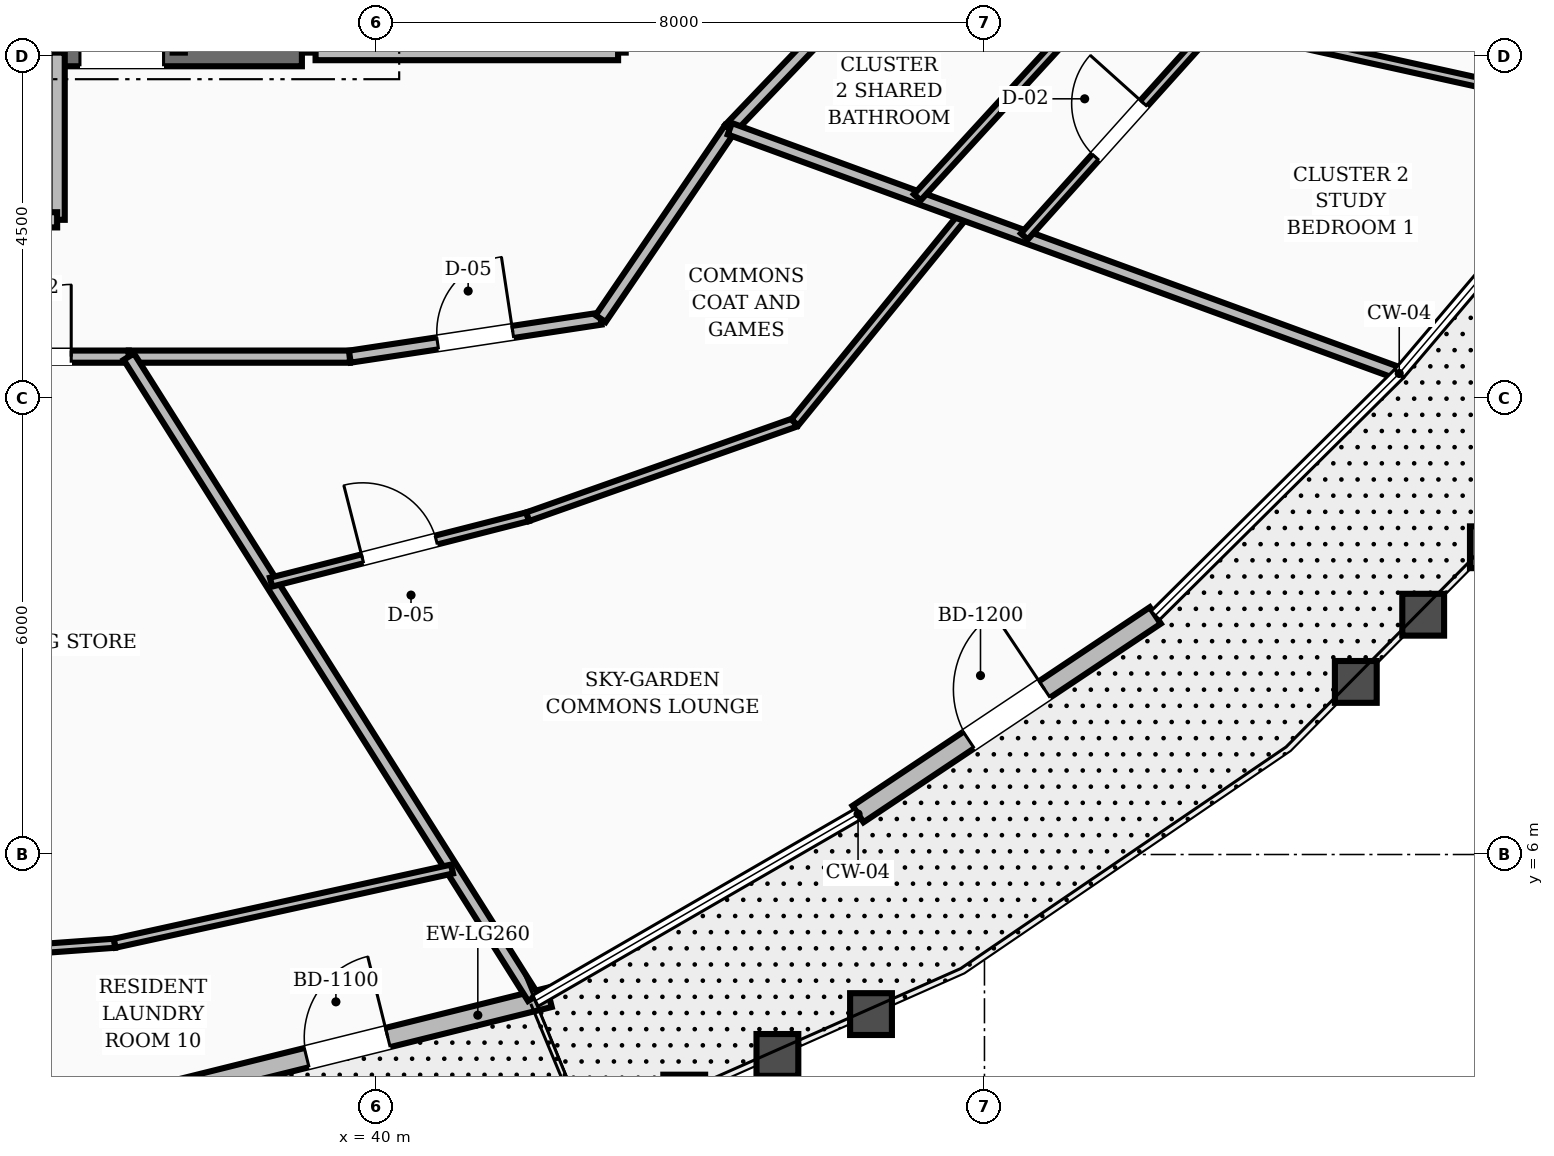
"""IFC4 building model, lengths in metres.
Left out: names, types, materials, properties, quantities, classifications, styles, units other than length and angle.
Written with IfcOpenShell. Run it as: python <this file> out.ifc"""

import sys

from ifc_helpers import new_model, si_unit, direction, frame, frame_2d, origin, place, context, subcontext, project, spatial, rectangle, extrude, element, fill, save


model = new_model("IFC4")
c1 = context("Model", 3, precision=1e-05, world=origin(), true_north=direction((0.0, 1.0)))
c2 = subcontext(c1, "Body", "Model", "MODEL_VIEW")
j1 = project(units=[si_unit("LENGTHUNIT", "METRE"), si_unit("PLANEANGLEUNIT", "RADIAN")], contexts=[c1])
p1 = place(None, origin())
s1 = spatial("IfcSite", under=j1, at=p1, CompositionType="ELEMENT")
p2 = place(p1, origin())
s2 = spatial("IfcBuilding", under=s1, at=p2, CompositionType="ELEMENT")
p3 = place(p2, frame((0.0, 0.0, 149.6)))
s3 = spatial("IfcBuildingStorey", under=s2, at=p3, CompositionType="ELEMENT", Elevation=149.6)
p4 = place(p3, frame((35.8, 16.55, 0.0), z_axis=(0.0, 0.0, 1.0), x_axis=(1.0, 0.0, 0.0)))
e1 = element("IfcWall", 1, at=p4, inside=s3, PredefinedType="SHEAR", context=c2, shape_type="SweptSolid", body=[
    extrude(rectangle(XDim=3.22, YDim=0.36, at=frame_2d((1.61, 0.0))), origin(), (0.0, 0.0, 1.0), 3.6),
])
p5 = place(p4, frame((0.3, 0.0, 0.0)))
e2 = element("IfcOpeningElement", 2, at=p5, cuts=e1, PredefinedType="OPENING", context=c2, shape_type="SweptSolid", body=[
    extrude(rectangle(XDim=1.1, YDim=2.1, at=frame_2d((0.55, 1.05))), frame((0.0, 0.19, 0.0), z_axis=(0.0, -1.0, 0.0), x_axis=(1.0, 0.0, 0.0)), (0.0, 0.0, 1.0), 0.38),
])
p6 = place(p3, frame((37.144, 2.846, 0.0), z_axis=(0.0, 0.0, 1.0), x_axis=(0.970567406562, 0.240829627165, 0.0)))
e3 = element("IfcWall", 3, at=p6, inside=s3, PredefinedType="STANDARD", context=c2, shape_type="SweptSolid", body=[
    extrude(rectangle(XDim=5.288, YDim=0.26, at=frame_2d((2.644, 0.0))), origin(), (0.0, 0.0, 1.0), 2.82),
])
p7 = place(p6, frame((1.998, 0.0, 0.0)))
e4 = element("IfcOpeningElement", 4, at=p7, cuts=e3, PredefinedType="OPENING", context=c2, shape_type="SweptSolid", body=[
    extrude(rectangle(XDim=1.1, YDim=2.15, at=frame_2d((0.55, 1.075))), frame((0.0, 0.14, 0.0), z_axis=(0.0, -1.0, 0.0), x_axis=(1.0, 0.0, 0.0)), (0.0, 0.0, 1.0), 0.28),
])
p8 = place(p3, frame((46.337, 6.532, 0.0), z_axis=(0.0, 0.0, 1.0), x_axis=(0.831514821752, 0.555502566336, 0.0)))
e5 = element("IfcWall", 5, at=p8, inside=s3, PredefinedType="STANDARD", context=c2, shape_type="SweptSolid", body=[
    extrude(rectangle(XDim=4.703, YDim=0.26, at=frame_2d((2.352, 0.0))), origin(), (0.0, 0.0, 1.0), 2.82),
])
p9 = place(p8, frame((1.751, 0.0, 0.0)))
e6 = element("IfcOpeningElement", 6, at=p9, cuts=e5, PredefinedType="OPENING", context=c2, shape_type="SweptSolid", body=[
    extrude(rectangle(XDim=1.2, YDim=2.15, at=frame_2d((0.6, 1.075))), frame((0.0, 0.14, 0.0), z_axis=(0.0, -1.0, 0.0), x_axis=(1.0, 0.0, 0.0)), (0.0, 0.0, 1.0), 0.28),
])
p10 = place(p3, frame((39.2, 16.55, 0.0), z_axis=(0.0, 0.0, 1.0), x_axis=(1.0, 0.0, 0.0)))
e7 = element("IfcWall", 7, at=p10, inside=s3, PredefinedType="SOLIDWALL", context=c2, shape_type="SweptSolid", body=[
    extrude(rectangle(XDim=3.98, YDim=0.2, at=frame_2d((1.99, 0.0))), origin(), (0.0, 0.0, 1.0), 2.8),
])
p11 = place(p3, frame((35.8, 14.35, 0.0), z_axis=(0.0, 0.0, 1.0), x_axis=(0.0, 1.0, 0.0)))
e8 = element("IfcWall", 8, at=p11, inside=s3, PredefinedType="SOLIDWALL", context=c2, shape_type="SweptSolid", body=[
    extrude(rectangle(XDim=2.2, YDim=0.2, at=frame_2d((1.1, 0.0))), origin(), (0.0, 0.0, 1.0), 2.8),
])
p12 = place(p3, frame((28.2, 14.35, 0.0), z_axis=(0.0, 0.0, 1.0), x_axis=(1.0, 0.0, 0.0)))
e9 = element("IfcWall", 9, at=p12, inside=s3, PredefinedType="SOLIDWALL", context=c2, shape_type="SweptSolid", body=[
    extrude(rectangle(XDim=7.6, YDim=0.2, at=frame_2d((3.8, 0.0))), origin(), (0.0, 0.0, 1.0), 2.8),
])
p13 = place(p12, frame((3.2, 0.0, 0.0)))
e10 = element("IfcOpeningElement", 10, at=p13, cuts=e9, PredefinedType="OPENING", context=c2, shape_type="SweptSolid", body=[
    extrude(rectangle(XDim=1.2, YDim=2.1, at=frame_2d((0.6, 1.05))), frame((0.0, 0.11, 0.0), z_axis=(0.0, -1.0, 0.0), x_axis=(1.0, 0.0, 0.0)), (0.0, 0.0, 1.0), 0.22),
])
p14 = place(p3, frame((34.278, 12.55, 0.0), z_axis=(0.0, 0.0, 1.0), x_axis=(1.0, 0.0, 0.0)))
e11 = element("IfcWall", 11, at=p14, inside=s3, PredefinedType="SOLIDWALL", context=c2, shape_type="SweptSolid", body=[
    extrude(rectangle(XDim=2.465, YDim=0.16, at=frame_2d((1.232, 0.0))), origin(), (0.0, 0.0, 1.0), 2.8),
])
p15 = place(p14, frame((0.758, 0.0, 0.0)))
e12 = element("IfcOpeningElement", 12, at=p15, cuts=e11, PredefinedType="OPENING", context=c2, shape_type="SweptSolid", body=[
    extrude(rectangle(XDim=0.95, YDim=2.1, at=frame_2d((0.475, 1.05))), frame((0.0, 0.09, 0.0), z_axis=(0.0, -1.0, 0.0), x_axis=(1.0, 0.0, 0.0)), (0.0, 0.0, 1.0), 0.18),
])
p16 = place(p3, frame((36.743, 12.55, 0.0), z_axis=(0.0, 0.0, 1.0), x_axis=(1.0, 0.0, 0.0)))
e13 = element("IfcWall", 13, at=p16, inside=s3, PredefinedType="SOLIDWALL", context=c2, shape_type="SweptSolid", body=[
    extrude(rectangle(XDim=2.908, YDim=0.16, at=frame_2d((1.454, 0.0))), origin(), (0.0, 0.0, 1.0), 2.8),
])
p17 = place(p3, frame((39.651, 12.55, 0.0), z_axis=(0.0, 0.0, 1.0), x_axis=(0.988710906508, 0.149835721217, 0.0)))
e14 = element("IfcWall", 14, at=p17, inside=s3, PredefinedType="SOLIDWALL", context=c2, shape_type="SweptSolid", body=[
    extrude(rectangle(XDim=3.337, YDim=0.16, at=frame_2d((1.668, 0.0))), origin(), (0.0, 0.0, 1.0), 2.8),
])
p18 = place(p17, frame((1.168, 0.0, 0.0)))
e15 = element("IfcOpeningElement", 15, at=p18, cuts=e14, PredefinedType="OPENING", context=c2, shape_type="SweptSolid", body=[
    extrude(rectangle(XDim=1.0, YDim=2.1, at=frame_2d((0.5, 1.05))), frame((0.0, 0.09, 0.0), z_axis=(0.0, -1.0, 0.0), x_axis=(1.0, 0.0, 0.0)), (0.0, 0.0, 1.0), 0.18),
])
p19 = place(p3, frame((42.95, 13.05, 0.0), z_axis=(0.0, 0.0, 1.0), x_axis=(0.562674669208, 0.826678423955, 0.0)))
e16 = element("IfcWall", 16, at=p19, inside=s3, PredefinedType="SOLIDWALL", context=c2, shape_type="SweptSolid", body=[
    extrude(rectangle(XDim=3.021, YDim=0.16, at=frame_2d((1.511, 0.0))), origin(), (0.0, 0.0, 1.0), 2.8),
])
p20 = place(p3, frame((44.65, 15.548, 0.0), z_axis=(0.0, 0.0, 1.0), x_axis=(0.691055487108, 0.722801711216, 0.0)))
e17 = element("IfcWall", 17, at=p20, inside=s3, PredefinedType="SOLIDWALL", context=c2, shape_type="SweptSolid", body=[
    extrude(rectangle(XDim=3.184, YDim=0.16, at=frame_2d((1.592, 0.0))), origin(), (0.0, 0.0, 1.0), 2.8),
])
p21 = place(p3, frame((36.743, 12.55, 0.0), z_axis=(0.0, 0.0, 1.0), x_axis=(0.533539707284, -0.84577501781, 0.0)))
e18 = element("IfcWall", 18, at=p21, inside=s3, PredefinedType="SOLIDWALL", context=c2, shape_type="SweptSolid", body=[
    extrude(rectangle(XDim=9.972, YDim=0.16, at=frame_2d((4.986, 0.0))), origin(), (0.0, 0.0, 1.0), 2.8),
])
p22 = place(p3, frame((38.614, 9.583, 0.0), z_axis=(0.0, 0.0, 1.0), x_axis=(0.969019467612, 0.246984354543, 0.0)))
e19 = element("IfcWall", 19, at=p22, inside=s3, PredefinedType="PARTITIONING", context=c2, shape_type="SweptSolid", body=[
    extrude(rectangle(XDim=3.484, YDim=0.12, at=frame_2d((1.742, 0.0))), origin(), (0.0, 0.0, 1.0), 2.8),
])
p23 = place(p22, frame((1.242, 0.0, 0.0)))
e20 = element("IfcOpeningElement", 20, at=p23, cuts=e19, PredefinedType="OPENING", context=c2, shape_type="SweptSolid", body=[
    extrude(rectangle(XDim=1.0, YDim=2.1, at=frame_2d((0.5, 1.05))), frame((0.0, 0.07, 0.0), z_axis=(0.0, -1.0, 0.0), x_axis=(1.0, 0.0, 0.0)), (0.0, 0.0, 1.0), 0.14),
])
p24 = place(p3, frame((41.991, 10.444, 0.0), z_axis=(0.0, 0.0, 1.0), x_axis=(0.943035086746, 0.332693289932, 0.0)))
e21 = element("IfcWall", 21, at=p24, inside=s3, PredefinedType="PARTITIONING", context=c2, shape_type="SweptSolid", body=[
    extrude(rectangle(XDim=3.726, YDim=0.12, at=frame_2d((1.863, 0.0))), origin(), (0.0, 0.0, 1.0), 2.8),
])
p25 = place(p3, frame((45.504, 11.683, 0.0), z_axis=(0.0, 0.0, 1.0), x_axis=(0.631277203428, 0.775557278628, 0.0)))
e22 = element("IfcWall", 22, at=p25, inside=s3, PredefinedType="PARTITIONING", context=c2, shape_type="SweptSolid", body=[
    extrude(rectangle(XDim=3.53, YDim=0.12, at=frame_2d((1.765, 0.0))), origin(), (0.0, 0.0, 1.0), 2.8),
])
p26 = place(p3, frame((44.65, 15.548, 0.0), z_axis=(0.0, 0.0, 1.0), x_axis=(0.939222726392, -0.343308418524, 0.0)))
e23 = element("IfcWall", 23, at=p26, inside=s3, PredefinedType="SOLIDWALL", context=c2, shape_type="SweptSolid", body=[
    extrude(rectangle(XDim=9.327, YDim=0.16, at=frame_2d((4.663, 0.0))), origin(), (0.0, 0.0, 1.0), 2.8),
])
p27 = place(p3, frame((47.116, 14.646, 0.0), z_axis=(0.0, 0.0, 1.0), x_axis=(0.675771389029, 0.737111273669, 0.0)))
e24 = element("IfcWall", 24, at=p27, inside=s3, PredefinedType="PARTITIONING", context=c2, shape_type="SweptSolid", body=[
    extrude(rectangle(XDim=3.546, YDim=0.12, at=frame_2d((1.773, 0.0))), origin(), (0.0, 0.0, 1.0), 2.8),
])
p28 = place(p3, frame((48.525, 14.131, 0.0), z_axis=(0.0, 0.0, 1.0), x_axis=(0.668314174757, 0.743879132533, 0.0)))
e25 = element("IfcWall", 25, at=p28, inside=s3, PredefinedType="PARTITIONING", context=c2, shape_type="SweptSolid", body=[
    extrude(rectangle(XDim=3.754, YDim=0.12, at=frame_2d((1.877, 0.0))), origin(), (0.0, 0.0, 1.0), 2.8),
])
p29 = place(p28, frame((1.402, 0.0, 0.0)))
e26 = element("IfcOpeningElement", 26, at=p29, cuts=e25, PredefinedType="OPENING", context=c2, shape_type="SweptSolid", body=[
    extrude(rectangle(XDim=0.95, YDim=2.1, at=frame_2d((0.475, 1.05))), frame((0.0, 0.07, 0.0), z_axis=(0.0, -1.0, 0.0), x_axis=(1.0, 0.0, 0.0)), (0.0, 0.0, 1.0), 0.14),
])
p30 = place(p3, frame((51.034, 16.924, 0.0), z_axis=(0.0, 0.0, 1.0), x_axis=(0.976410849666, -0.21592094075, 0.0)))
e27 = element("IfcWall", 27, at=p30, inside=s3, PredefinedType="PARTITIONING", context=c2, shape_type="SweptSolid", body=[
    extrude(rectangle(XDim=5.404, YDim=0.12, at=frame_2d((2.702, 0.0))), origin(), (0.0, 0.0, 1.0), 2.8),
])
p31 = place(p3, frame((32.0, 4.503, 0.0), z_axis=(0.0, 0.0, 1.0), x_axis=(0.997394556416, 0.072139440191, 0.0)))
e28 = element("IfcWall", 28, at=p31, inside=s3, PredefinedType="PARTITIONING", context=c2, shape_type="SweptSolid", body=[
    extrude(rectangle(XDim=4.569, YDim=0.12, at=frame_2d((2.284, 0.0))), origin(), (0.0, 0.0, 1.0), 2.8),
])
p32 = place(p31, frame((1.81, 0.0, 0.0)))
e29 = element("IfcOpeningElement", 29, at=p32, cuts=e28, PredefinedType="OPENING", context=c2, shape_type="SweptSolid", body=[
    extrude(rectangle(XDim=0.95, YDim=2.1, at=frame_2d((0.475, 1.05))), frame((0.0, 0.07, 0.0), z_axis=(0.0, -1.0, 0.0), x_axis=(1.0, 0.0, 0.0)), (0.0, 0.0, 1.0), 0.14),
])
p33 = place(p3, frame((36.557, 4.833, 0.0), z_axis=(0.0, 0.0, 1.0), x_axis=(0.976660021945, 0.21479106484, 0.0)))
e30 = element("IfcWall", 30, at=p33, inside=s3, PredefinedType="PARTITIONING", context=c2, shape_type="SweptSolid", body=[
    extrude(rectangle(XDim=4.544, YDim=0.12, at=frame_2d((2.272, 0.0))), origin(), (0.0, 0.0, 1.0), 2.8),
])
p34 = place(p7, origin())
e31 = element("IfcDoor", 31, at=p34, inside=s3, OperationType="SINGLE_SWING_RIGHT", PredefinedType="DOOR", context=c2, shape_type="SweptSolid", body=[
    extrude(rectangle(XDim=1.1, YDim=2.15, at=frame_2d((0.55, 1.075))), frame((0.0, 0.025, 0.0), z_axis=(0.0, -1.0, 0.0), x_axis=(1.0, 0.0, 0.0)), (0.0, 0.0, 1.0), 0.05),
])
fill(e4, e31)
p35 = place(p9, origin())
e32 = element("IfcDoor", 32, at=p35, inside=s3, OperationType="SINGLE_SWING_RIGHT", PredefinedType="DOOR", context=c2, shape_type="SweptSolid", body=[
    extrude(rectangle(XDim=1.2, YDim=2.15, at=frame_2d((0.6, 1.075))), frame((0.0, 0.025, 0.0), z_axis=(0.0, -1.0, 0.0), x_axis=(1.0, 0.0, 0.0)), (0.0, 0.0, 1.0), 0.05),
])
fill(e6, e32)
p36 = place(p5, origin())
e33 = element("IfcDoor", 33, at=p36, inside=s3, OperationType="SINGLE_SWING_RIGHT", PredefinedType="DOOR", context=c2, shape_type="SweptSolid", body=[
    extrude(rectangle(XDim=1.1, YDim=2.1, at=frame_2d((0.55, 1.05))), frame((0.0, 0.025, 0.0), z_axis=(0.0, -1.0, 0.0), x_axis=(1.0, 0.0, 0.0)), (0.0, 0.0, 1.0), 0.05),
])
fill(e2, e33)
p37 = place(p18, origin())
e34 = element("IfcDoor", 34, at=p37, inside=s3, OperationType="SINGLE_SWING_RIGHT", PredefinedType="DOOR", context=c2, shape_type="SweptSolid", body=[
    extrude(rectangle(XDim=1.0, YDim=2.1, at=frame_2d((0.5, 1.05))), frame((0.0, 0.025, 0.0), z_axis=(0.0, -1.0, 0.0), x_axis=(1.0, 0.0, 0.0)), (0.0, 0.0, 1.0), 0.05),
])
fill(e15, e34)
p38 = place(p23, origin())
e35 = element("IfcDoor", 35, at=p38, inside=s3, OperationType="SINGLE_SWING_LEFT", PredefinedType="DOOR", context=c2, shape_type="SweptSolid", body=[
    extrude(rectangle(XDim=1.0, YDim=2.1, at=frame_2d((0.5, 1.05))), frame((0.0, 0.025, 0.0), z_axis=(0.0, -1.0, 0.0), x_axis=(1.0, 0.0, 0.0)), (0.0, 0.0, 1.0), 0.05),
])
fill(e20, e35)
p39 = place(p29, origin())
e36 = element("IfcDoor", 36, at=p39, inside=s3, OperationType="SINGLE_SWING_RIGHT", PredefinedType="DOOR", context=c2, shape_type="SweptSolid", body=[
    extrude(rectangle(XDim=0.95, YDim=2.1, at=frame_2d((0.475, 1.05))), frame((0.0, 0.025, 0.0), z_axis=(0.0, -1.0, 0.0), x_axis=(1.0, 0.0, 0.0)), (0.0, 0.0, 1.0), 0.05),
])
fill(e26, e36)
p40 = place(p15, origin())
e37 = element("IfcDoor", 37, at=p40, inside=s3, OperationType="SINGLE_SWING_RIGHT", PredefinedType="DOOR", context=c2, shape_type="SweptSolid", body=[
    extrude(rectangle(XDim=0.95, YDim=2.1, at=frame_2d((0.475, 1.05))), frame((0.0, 0.025, 0.0), z_axis=(0.0, -1.0, 0.0), x_axis=(1.0, 0.0, 0.0)), (0.0, 0.0, 1.0), 0.05),
])
fill(e12, e37)
save(model, sys.argv[1])
